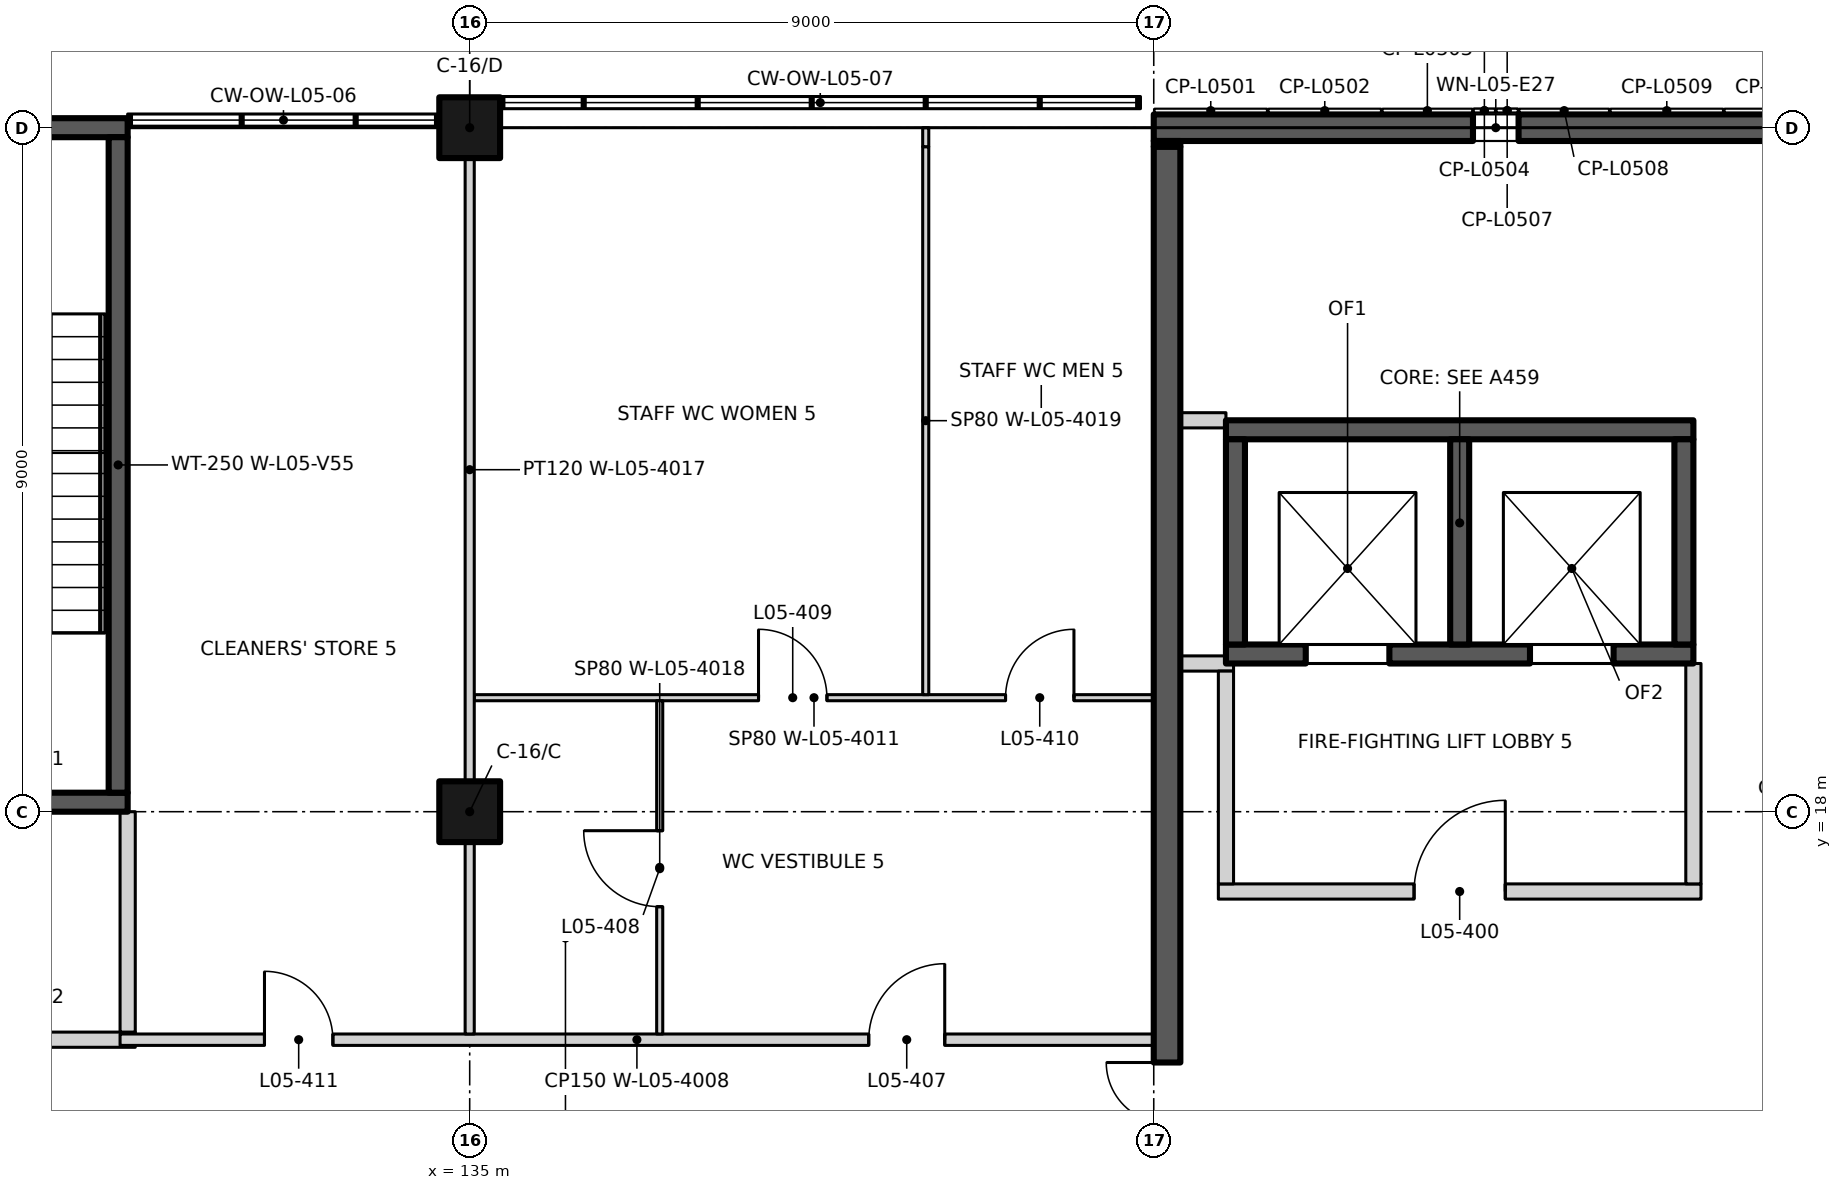
"""IFC4 building model, lengths in metres.
Left out: names, types, materials, properties, quantities, classifications, styles, units other than length and angle.
Written with IfcOpenShell. Run it as: python <this file> out.ifc"""

import sys

from ifc_helpers import new_model, si_unit, direction, frame, frame_2d, origin, origin_2d, place, context, subcontext, project, spatial, rectangle, extrude, element, fill, save


model = new_model("IFC4")
c1 = context("Model", 3, precision=1e-05, world=origin(), true_north=direction((0.0, 1.0)))
c2 = subcontext(c1, "Body", "Model", "MODEL_VIEW")
j1 = project(units=[si_unit("LENGTHUNIT", "METRE"), si_unit("PLANEANGLEUNIT", "RADIAN")], contexts=[c1])
p1 = place(None, origin())
s1 = spatial("IfcSite", under=j1, at=p1, CompositionType="ELEMENT")
p2 = place(p1, origin())
s2 = spatial("IfcBuilding", under=s1, at=p2, CompositionType="ELEMENT")
p3 = place(p2, frame((0.0, 0.0, 24.0)))
s3 = spatial("IfcBuildingStorey", under=s2, at=p3, CompositionType="ELEMENT", Elevation=24.0)
for number, where, z_axis, x_axis in (
    (1, (135.0, 18.0, 0.0), (0.0, 0.0, 1.0), (1.0, 0.0, 0.0)),
    (2, (135.0, 27.0, 0.0), (0.0, 0.0, 1.0), (1.0, 0.0, 0.0)),
):
    element("IfcColumn", number, at=place(p3, frame(where, z_axis=z_axis, x_axis=x_axis)), inside=s3, PredefinedType="COLUMN", context=c2, shape_type="SweptSolid", body=[
        extrude(rectangle(XDim=0.8, YDim=0.8, at=origin_2d()), origin(), (0.0, 0.0, 1.0), 4.5),
    ])
p4 = place(p3, frame((126.4, 18.125, 0.0), z_axis=(0.0, 0.0, 1.0), x_axis=(1.0, 0.0, 0.0)))
e3 = element("IfcWall", 3, at=p4, inside=s3, PredefinedType="SHEAR", context=c2, shape_type="SweptSolid", body=[
    extrude(rectangle(XDim=4.1, YDim=0.25, at=frame_2d((2.05, 0.0))), origin(), (0.0, 0.0, 1.0), 4.5),
])
p5 = place(p4, frame((1.3, 0.0, 0.0)))
e4 = element("IfcOpeningElement", 4, at=p5, cuts=e3, PredefinedType="OPENING", context=c2, shape_type="SweptSolid", body=[
    extrude(rectangle(XDim=1.1, YDim=2.1, at=frame_2d((0.55, 1.05))), frame((0.0, 0.135, 0.0), z_axis=(0.0, -1.0, 0.0), x_axis=(1.0, 0.0, 0.0)), (0.0, 0.0, 1.0), 0.27),
])
p6 = place(p3, frame((128.188, 27.0, 0.0), z_axis=(0.0, 0.0, 1.0), x_axis=(1.0, 0.0, 0.0)))
e5 = element("IfcWall", 5, at=p6, inside=s3, PredefinedType="SHEAR", context=c2, shape_type="SweptSolid", body=[
    extrude(rectangle(XDim=2.312, YDim=0.25, at=frame_2d((1.156, 0.0))), origin(), (0.0, 0.0, 1.0), 4.5),
])
p7 = place(p3, frame((130.375, 18.25, 0.0), z_axis=(0.0, 0.0, 1.0), x_axis=(0.0, 1.0, 0.0)))
e6 = element("IfcWall", 6, at=p7, inside=s3, PredefinedType="SHEAR", context=c2, shape_type="SweptSolid", body=[
    extrude(rectangle(XDim=8.625, YDim=0.25, at=frame_2d((4.312, 0.0))), origin(), (0.0, 0.0, 1.0), 4.5),
])
p8 = place(p3, frame((144.95, 20.075, 0.0), z_axis=(0.0, 0.0, 1.0), x_axis=(1.0, 0.0, 0.0)))
e7 = element("IfcWall", 7, at=p8, inside=s3, PredefinedType="SHEAR", context=c2, shape_type="SweptSolid", body=[
    extrude(rectangle(XDim=6.15, YDim=0.25, at=frame_2d((3.075, 0.0))), origin(), (0.0, 0.0, 1.0), 4.5),
])
p9 = place(p8, frame((1.05, 0.0, 0.0)))
e8 = element("IfcOpeningElement", 8, at=p9, cuts=e7, PredefinedType="OPENING", context=c2, shape_type="SweptSolid", body=[
    extrude(rectangle(XDim=1.1, YDim=2.1, at=frame_2d((0.55, 1.05))), frame((0.0, 0.135, 0.0), z_axis=(0.0, -1.0, 0.0), x_axis=(1.0, 0.0, 0.0)), (0.0, 0.0, 1.0), 0.27),
])
p10 = place(p8, frame((4.0, 0.0, 0.0)))
e9 = element("IfcOpeningElement", 9, at=p10, cuts=e7, PredefinedType="OPENING", context=c2, shape_type="SweptSolid", body=[
    extrude(rectangle(XDim=1.1, YDim=2.1, at=frame_2d((0.55, 1.05))), frame((0.0, 0.135, 0.0), z_axis=(0.0, -1.0, 0.0), x_axis=(1.0, 0.0, 0.0)), (0.0, 0.0, 1.0), 0.27),
])
p11 = place(p3, frame((144.95, 23.025, 0.0), z_axis=(0.0, 0.0, 1.0), x_axis=(1.0, 0.0, 0.0)))
e10 = element("IfcWall", 10, at=p11, inside=s3, PredefinedType="SHEAR", context=c2, shape_type="SweptSolid", body=[
    extrude(rectangle(XDim=6.15, YDim=0.25, at=frame_2d((3.075, 0.0))), origin(), (0.0, 0.0, 1.0), 4.5),
])
for number, where, z_axis, x_axis in (
    (11, (145.075, 20.2, 0.0), (0.0, 0.0, 1.0), (0.0, 1.0, 0.0)),
    (12, (148.025, 20.2, 0.0), (0.0, 0.0, 1.0), (0.0, 1.0, 0.0)),
    (13, (150.975, 20.2, 0.0), (0.0, 0.0, 1.0), (0.0, 1.0, 0.0)),
):
    element("IfcWall", number, at=place(p3, frame(where, z_axis=z_axis, x_axis=x_axis)), inside=s3, PredefinedType="SHEAR", context=c2, shape_type="SweptSolid", body=[
        extrude(rectangle(XDim=2.7, YDim=0.25, at=frame_2d((1.35, 0.0))), origin(), (0.0, 0.0, 1.0), 4.5),
    ])
p12 = place(p3, frame((144.0, 27.0, 0.0), z_axis=(0.0, 0.0, 1.0), x_axis=(1.0, 0.0, 0.0)))
e14 = element("IfcWall", 14, at=p12, inside=s3, PredefinedType="SOLIDWALL", context=c2, shape_type="SweptSolid", body=[
    extrude(rectangle(XDim=18.0, YDim=0.35, at=frame_2d((9.0, 0.0))), origin(), (0.0, 0.0, 1.0), 3.6),
])
p13 = place(p12, frame((4.2, 0.0, 0.6)))
e15 = element("IfcOpeningElement", 15, at=p13, cuts=e14, PredefinedType="OPENING", context=c2, shape_type="SweptSolid", body=[
    extrude(rectangle(XDim=0.6, YDim=2.4, at=frame_2d((0.3, 1.2))), frame((0.0, 0.185, 0.0), z_axis=(0.0, -1.0, 0.0), x_axis=(1.0, 0.0, 0.0)), (0.0, 0.0, 1.0), 0.37),
])
p14 = place(p12, frame((13.2, 0.0, 0.6)))
e16 = element("IfcOpeningElement", 16, at=p14, cuts=e14, PredefinedType="OPENING", context=c2, shape_type="SweptSolid", body=[
    extrude(rectangle(XDim=0.6, YDim=2.4, at=frame_2d((0.3, 1.2))), frame((0.0, 0.185, 0.0), z_axis=(0.0, -1.0, 0.0), x_axis=(1.0, 0.0, 0.0)), (0.0, 0.0, 1.0), 0.37),
])
p15 = place(p3, frame((126.25, 15.0, 0.0), z_axis=(0.0, 0.0, 1.0), x_axis=(1.0, 0.0, 0.0)))
e17 = element("IfcWall", 17, at=p15, inside=s3, PredefinedType="PARTITIONING", context=c2, shape_type="SweptSolid", body=[
    extrude(rectangle(XDim=4.35, YDim=0.2, at=frame_2d((2.175, 0.0))), origin(), (0.0, 0.0, 1.0), 4.2),
])
p16 = place(p15, frame((1.4, 0.0, 0.0)))
e18 = element("IfcOpeningElement", 18, at=p16, cuts=e17, PredefinedType="OPENING", context=c2, shape_type="SweptSolid", body=[
    extrude(rectangle(XDim=1.2, YDim=2.1, at=frame_2d((0.6, 1.05))), frame((0.0, 0.11, 0.0), z_axis=(0.0, -1.0, 0.0), x_axis=(1.0, 0.0, 0.0)), (0.0, 0.0, 1.0), 0.22),
])
p17 = place(p3, frame((130.4, 15.0, 0.0), z_axis=(0.0, 0.0, 1.0), x_axis=(1.0, 0.0, 0.0)))
e19 = element("IfcWall", 19, at=p17, inside=s3, PredefinedType="PARTITIONING", context=c2, shape_type="SweptSolid", body=[
    extrude(rectangle(XDim=13.6, YDim=0.15, at=frame_2d((6.8, 0.0))), origin(), (0.0, 0.0, 1.0), 4.2),
])
p18 = place(p17, frame((9.85, 0.0, 0.0)))
e20 = element("IfcOpeningElement", 20, at=p18, cuts=e19, PredefinedType="OPENING", context=c2, shape_type="SweptSolid", body=[
    extrude(rectangle(XDim=1.0, YDim=2.1, at=frame_2d((0.5, 1.05))), frame((0.0, 0.085, 0.0), z_axis=(0.0, -1.0, 0.0), x_axis=(1.0, 0.0, 0.0)), (0.0, 0.0, 1.0), 0.17),
])
p19 = place(p17, frame((1.9, 0.0, 0.0)))
e21 = element("IfcOpeningElement", 21, at=p19, cuts=e19, PredefinedType="OPENING", context=c2, shape_type="SweptSolid", body=[
    extrude(rectangle(XDim=0.9, YDim=2.1, at=frame_2d((0.45, 1.05))), frame((0.0, 0.085, 0.0), z_axis=(0.0, -1.0, 0.0), x_axis=(1.0, 0.0, 0.0)), (0.0, 0.0, 1.0), 0.17),
])
p20 = place(p3, frame((144.85, 16.95, 0.0), z_axis=(0.0, 0.0, 1.0), x_axis=(1.0, 0.0, 0.0)))
e22 = element("IfcWall", 22, at=p20, inside=s3, PredefinedType="PARTITIONING", context=c2, shape_type="SweptSolid", body=[
    extrude(rectangle(XDim=6.35, YDim=0.2, at=frame_2d((3.175, 0.0))), origin(), (0.0, 0.0, 1.0), 4.2),
])
p21 = place(p20, frame((2.575, 0.0, 0.0)))
e23 = element("IfcOpeningElement", 23, at=p21, cuts=e22, PredefinedType="OPENING", context=c2, shape_type="SweptSolid", body=[
    extrude(rectangle(XDim=1.2, YDim=2.1, at=frame_2d((0.6, 1.05))), frame((0.0, 0.11, 0.0), z_axis=(0.0, -1.0, 0.0), x_axis=(1.0, 0.0, 0.0)), (0.0, 0.0, 1.0), 0.22),
])
p22 = place(p3, frame((135.06, 19.5, 0.0), z_axis=(0.0, 0.0, 1.0), x_axis=(1.0, 0.0, 0.0)))
e24 = element("IfcWall", 24, at=p22, inside=s3, PredefinedType="PARTITIONING", context=c2, shape_type="SweptSolid", body=[
    extrude(rectangle(XDim=8.94, YDim=0.08, at=frame_2d((4.47, 0.0))), origin(), (0.0, 0.0, 1.0), 4.2),
])
p23 = place(p22, frame((3.74, 0.0, 0.0)))
e25 = element("IfcOpeningElement", 25, at=p23, cuts=e24, PredefinedType="OPENING", context=c2, shape_type="SweptSolid", body=[
    extrude(rectangle(XDim=0.9, YDim=2.1, at=frame_2d((0.45, 1.05))), frame((0.0, 0.05, 0.0), z_axis=(0.0, -1.0, 0.0), x_axis=(1.0, 0.0, 0.0)), (0.0, 0.0, 1.0), 0.1),
])
p24 = place(p22, frame((6.99, 0.0, 0.0)))
e26 = element("IfcOpeningElement", 26, at=p24, cuts=e24, PredefinedType="OPENING", context=c2, shape_type="SweptSolid", body=[
    extrude(rectangle(XDim=0.9, YDim=2.1, at=frame_2d((0.45, 1.05))), frame((0.0, 0.05, 0.0), z_axis=(0.0, -1.0, 0.0), x_axis=(1.0, 0.0, 0.0)), (0.0, 0.0, 1.0), 0.1),
])
p25 = place(p3, frame((144.35, 19.95, 0.0), z_axis=(0.0, 0.0, 1.0), x_axis=(1.0, 0.0, 0.0)))
e27 = element("IfcWall", 27, at=p25, inside=s3, PredefinedType="PARTITIONING", context=c2, shape_type="SweptSolid", body=[
    extrude(rectangle(XDim=0.7, YDim=0.2, at=frame_2d((0.35, 0.0))), origin(), (0.0, 0.0, 1.0), 4.2),
])
p26 = place(p3, frame((144.35, 23.15, 0.0), z_axis=(0.0, 0.0, 1.0), x_axis=(1.0, 0.0, 0.0)))
e28 = element("IfcWall", 28, at=p26, inside=s3, PredefinedType="PARTITIONING", context=c2, shape_type="SweptSolid", body=[
    extrude(rectangle(XDim=0.6, YDim=0.2, at=frame_2d((0.3, 0.0))), origin(), (0.0, 0.0, 1.0), 4.2),
])
p27 = place(p3, frame((130.5, 15.1, 0.0), z_axis=(0.0, 0.0, 1.0), x_axis=(0.0, 1.0, 0.0)))
e29 = element("IfcWall", 29, at=p27, inside=s3, PredefinedType="PARTITIONING", context=c2, shape_type="SweptSolid", body=[
    extrude(rectangle(XDim=2.9, YDim=0.2, at=frame_2d((1.45, 0.0))), origin(), (0.0, 0.0, 1.0), 4.2),
])
p28 = place(p3, frame((135.0, 15.075, 0.0), z_axis=(0.0, 0.0, 1.0), x_axis=(0.0, 1.0, 0.0)))
e30 = element("IfcWall", 30, at=p28, inside=s3, PredefinedType="PARTITIONING", context=c2, shape_type="SweptSolid", body=[
    extrude(rectangle(XDim=2.525, YDim=0.12, at=frame_2d((1.263, 0.0))), origin(), (0.0, 0.0, 1.0), 4.2),
])
p29 = place(p3, frame((135.0, 18.4, 0.0), z_axis=(0.0, 0.0, 1.0), x_axis=(0.0, 1.0, 0.0)))
e31 = element("IfcWall", 31, at=p29, inside=s3, PredefinedType="PARTITIONING", context=c2, shape_type="SweptSolid", body=[
    extrude(rectangle(XDim=8.2, YDim=0.12, at=frame_2d((4.1, 0.0))), origin(), (0.0, 0.0, 1.0), 4.2),
])
p30 = place(p3, frame((137.5, 15.075, 0.0), z_axis=(0.0, 0.0, 1.0), x_axis=(0.0, 1.0, 0.0)))
e32 = element("IfcWall", 32, at=p30, inside=s3, PredefinedType="PARTITIONING", context=c2, shape_type="SweptSolid", body=[
    extrude(rectangle(XDim=4.385, YDim=0.08, at=frame_2d((2.192, 0.0))), origin(), (0.0, 0.0, 1.0), 4.2),
])
p31 = place(p30, frame((1.675, 0.0, 0.0)))
e33 = element("IfcOpeningElement", 33, at=p31, cuts=e32, PredefinedType="OPENING", context=c2, shape_type="SweptSolid", body=[
    extrude(rectangle(XDim=1.0, YDim=2.1, at=frame_2d((0.5, 1.05))), frame((0.0, 0.05, 0.0), z_axis=(0.0, -1.0, 0.0), x_axis=(1.0, 0.0, 0.0)), (0.0, 0.0, 1.0), 0.1),
])
p32 = place(p3, frame((141.0, 19.54, 0.0), z_axis=(0.0, 0.0, 1.0), x_axis=(0.0, 1.0, 0.0)))
e34 = element("IfcWall", 34, at=p32, inside=s3, PredefinedType="PARTITIONING", context=c2, shape_type="SweptSolid", body=[
    extrude(rectangle(XDim=7.21, YDim=0.08, at=frame_2d((3.605, 0.0))), origin(), (0.0, 0.0, 1.0), 4.2),
])
p33 = place(p3, frame((141.0, 26.75, 0.0), z_axis=(0.0, 0.0, 1.0), x_axis=(0.0, 1.0, 0.0)))
e35 = element("IfcWall", 35, at=p33, inside=s3, PredefinedType="PARTITIONING", context=c2, shape_type="SweptSolid", body=[
    extrude(rectangle(XDim=0.25, YDim=0.08, at=frame_2d((0.125, 0.0))), origin(), (0.0, 0.0, 1.0), 3.6),
])
p34 = place(p3, frame((144.175, 9.35, 0.0), z_axis=(0.0, 0.0, 1.0), x_axis=(0.0, 1.0, 0.0)))
e36 = element("IfcWall", 36, at=p34, inside=s3, PredefinedType="SHEAR", context=c2, shape_type="SweptSolid", body=[
    extrude(rectangle(XDim=17.4, YDim=0.35, at=frame_2d((8.7, 0.0))), origin(), (0.0, 0.0, 1.0), 4.2),
])
p35 = place(p34, frame((3.75, 0.0, 0.0)))
e37 = element("IfcOpeningElement", 37, at=p35, cuts=e36, PredefinedType="OPENING", context=c2, shape_type="SweptSolid", body=[
    extrude(rectangle(XDim=1.6, YDim=2.4, at=frame_2d((0.8, 1.2))), frame((0.0, 0.185, 0.0), z_axis=(0.0, -1.0, 0.0), x_axis=(1.0, 0.0, 0.0)), (0.0, 0.0, 1.0), 0.37),
])
p36 = place(p3, frame((144.175, 26.75, 0.0), z_axis=(0.0, 0.0, 1.0), x_axis=(0.0, 1.0, 0.0)))
e38 = element("IfcWall", 38, at=p36, inside=s3, PredefinedType="SHEAR", context=c2, shape_type="SweptSolid", body=[
    extrude(rectangle(XDim=0.075, YDim=0.35, at=frame_2d((0.038, 0.0))), origin(), (0.0, 0.0, 1.0), 3.6),
])
p37 = place(p3, frame((144.95, 17.05, 0.0), z_axis=(0.0, 0.0, 1.0), x_axis=(0.0, 1.0, 0.0)))
e39 = element("IfcWall", 39, at=p37, inside=s3, PredefinedType="PARTITIONING", context=c2, shape_type="SweptSolid", body=[
    extrude(rectangle(XDim=2.8, YDim=0.2, at=frame_2d((1.4, 0.0))), origin(), (0.0, 0.0, 1.0), 4.2),
])
p38 = place(p3, frame((151.1, 17.05, 0.0), z_axis=(0.0, 0.0, 1.0), x_axis=(0.0, 1.0, 0.0)))
e40 = element("IfcWall", 40, at=p38, inside=s3, PredefinedType="PARTITIONING", context=c2, shape_type="SweptSolid", body=[
    extrude(rectangle(XDim=2.9, YDim=0.2, at=frame_2d((1.45, 0.0))), origin(), (0.0, 0.0, 1.0), 4.2),
])
p39 = place(p9, origin())
e41 = element("IfcDoor", 41, at=p39, inside=s3, OperationType="DOUBLE_DOOR_SLIDING", PredefinedType="DOOR", context=c2, shape_type="SweptSolid", body=[
    extrude(rectangle(XDim=1.1, YDim=2.1, at=frame_2d((0.55, 1.05))), frame((0.0, 0.025, 0.0), z_axis=(0.0, -1.0, 0.0), x_axis=(1.0, 0.0, 0.0)), (0.0, 0.0, 1.0), 0.05),
])
fill(e8, e41)
p40 = place(p10, origin())
e42 = element("IfcDoor", 42, at=p40, inside=s3, OperationType="DOUBLE_DOOR_SLIDING", PredefinedType="DOOR", context=c2, shape_type="SweptSolid", body=[
    extrude(rectangle(XDim=1.1, YDim=2.1, at=frame_2d((0.55, 1.05))), frame((0.0, 0.025, 0.0), z_axis=(0.0, -1.0, 0.0), x_axis=(1.0, 0.0, 0.0)), (0.0, 0.0, 1.0), 0.05),
])
fill(e9, e42)
p41 = place(p13, origin())
e43 = element("IfcWindow", 43, at=p41, inside=s3, PartitioningType="SINGLE_PANEL", PredefinedType="WINDOW", context=c2, shape_type="SweptSolid", body=[
    extrude(rectangle(XDim=0.6, YDim=2.4, at=frame_2d((0.3, 1.2))), frame((0.0, -0.005, 0.0), z_axis=(0.0, -1.0, 0.0), x_axis=(1.0, 0.0, 0.0)), (0.0, 0.0, 1.0), 0.06),
])
fill(e15, e43)
p42 = place(p21, origin())
e44 = element("IfcDoor", 44, at=p42, inside=s3, OperationType="SINGLE_SWING_RIGHT", PredefinedType="DOOR", context=c2, shape_type="SweptSolid", body=[
    extrude(rectangle(XDim=1.2, YDim=2.1, at=frame_2d((0.6, 1.05))), frame((0.0, 0.025, 0.0), z_axis=(0.0, -1.0, 0.0), x_axis=(1.0, 0.0, 0.0)), (0.0, 0.0, 1.0), 0.05),
])
fill(e23, e44)
p43 = place(p35, origin())
e45 = element("IfcDoor", 45, at=p43, inside=s3, OperationType="DOUBLE_DOOR_SINGLE_SWING", PredefinedType="DOOR", context=c2, shape_type="SweptSolid", body=[
    extrude(rectangle(XDim=1.6, YDim=2.4, at=frame_2d((0.8, 1.2))), frame((0.0, 0.025, 0.0), z_axis=(0.0, -1.0, 0.0), x_axis=(1.0, 0.0, 0.0)), (0.0, 0.0, 1.0), 0.05),
])
fill(e37, e45)
p44 = place(p18, origin())
e46 = element("IfcDoor", 46, at=p44, inside=s3, OperationType="SINGLE_SWING_RIGHT", PredefinedType="DOOR", context=c2, shape_type="SweptSolid", body=[
    extrude(rectangle(XDim=1.0, YDim=2.1, at=frame_2d((0.5, 1.05))), frame((0.0, 0.025, 0.0), z_axis=(0.0, -1.0, 0.0), x_axis=(1.0, 0.0, 0.0)), (0.0, 0.0, 1.0), 0.05),
])
fill(e20, e46)
p45 = place(p31, origin())
e47 = element("IfcDoor", 47, at=p45, inside=s3, OperationType="SINGLE_SWING_RIGHT", PredefinedType="DOOR", context=c2, shape_type="SweptSolid", body=[
    extrude(rectangle(XDim=1.0, YDim=2.1, at=frame_2d((0.5, 1.05))), frame((0.0, 0.025, 0.0), z_axis=(0.0, -1.0, 0.0), x_axis=(1.0, 0.0, 0.0)), (0.0, 0.0, 1.0), 0.05),
])
fill(e33, e47)
p46 = place(p23, origin())
e48 = element("IfcDoor", 48, at=p46, inside=s3, OperationType="SINGLE_SWING_LEFT", PredefinedType="DOOR", context=c2, shape_type="SweptSolid", body=[
    extrude(rectangle(XDim=0.9, YDim=2.1, at=frame_2d((0.45, 1.05))), frame((0.0, 0.025, 0.0), z_axis=(0.0, -1.0, 0.0), x_axis=(1.0, 0.0, 0.0)), (0.0, 0.0, 1.0), 0.05),
])
fill(e25, e48)
p47 = place(p24, origin())
e49 = element("IfcDoor", 49, at=p47, inside=s3, OperationType="SINGLE_SWING_RIGHT", PredefinedType="DOOR", context=c2, shape_type="SweptSolid", body=[
    extrude(rectangle(XDim=0.9, YDim=2.1, at=frame_2d((0.45, 1.05))), frame((0.0, 0.025, 0.0), z_axis=(0.0, -1.0, 0.0), x_axis=(1.0, 0.0, 0.0)), (0.0, 0.0, 1.0), 0.05),
])
fill(e26, e49)
p48 = place(p19, origin())
e50 = element("IfcDoor", 50, at=p48, inside=s3, OperationType="SINGLE_SWING_LEFT", PredefinedType="DOOR", context=c2, shape_type="SweptSolid", body=[
    extrude(rectangle(XDim=0.9, YDim=2.1, at=frame_2d((0.45, 1.05))), frame((0.0, 0.025, 0.0), z_axis=(0.0, -1.0, 0.0), x_axis=(1.0, 0.0, 0.0)), (0.0, 0.0, 1.0), 0.05),
])
fill(e21, e50)
save(model, sys.argv[1])
